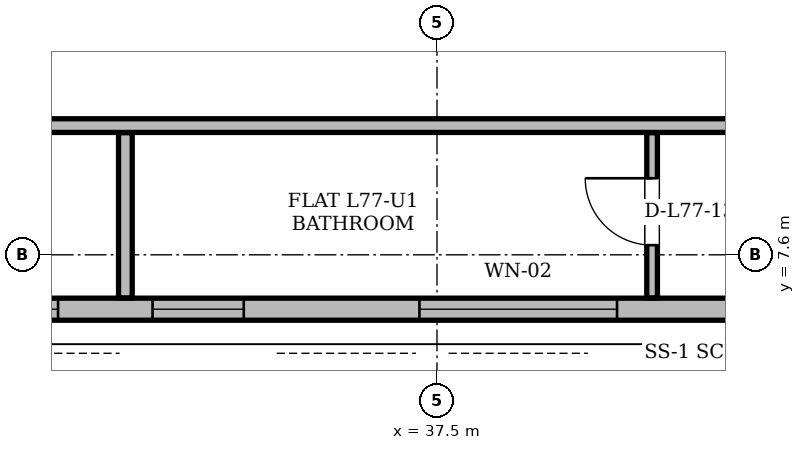
"""IFC4 building model, lengths in metres.
Left out: names, types, materials, properties, quantities, classifications, styles, units other than length and angle.
Written with IfcOpenShell. Run it as: python <this file> out.ifc"""

import sys

from ifc_helpers import new_model, si_unit, direction, frame, frame_2d, origin, place, context, subcontext, project, spatial, rectangle, extrude, element, fill, save


model = new_model("IFC4")
c1 = context("Model", 3, precision=1e-05, world=origin(), true_north=direction((0.0, 1.0)))
c2 = subcontext(c1, "Body", "Model", "MODEL_VIEW")
j1 = project(units=[si_unit("LENGTHUNIT", "METRE"), si_unit("PLANEANGLEUNIT", "RADIAN")], contexts=[c1])
p1 = place(None, origin())
s1 = spatial("IfcSite", under=j1, at=p1, CompositionType="ELEMENT")
p2 = place(p1, origin())
s2 = spatial("IfcBuilding", under=s1, at=p2, CompositionType="ELEMENT")
p3 = place(p2, frame((0.0, 0.0, 292.8)))
s3 = spatial("IfcBuildingStorey", under=s2, at=p3, CompositionType="ELEMENT", Elevation=292.8)
p4 = place(p3, frame((18.715, 6.885, 0.0), z_axis=(0.0, 0.0, 1.0), x_axis=(1.0, 0.0, 0.0)))
e1 = element("IfcWall", 1, at=p4, inside=s3, PredefinedType="SOLIDWALL", context=c2, shape_type="SweptSolid", body=[
    extrude(rectangle(XDim=37.57, YDim=0.29, at=frame_2d((18.785, 0.0))), origin(), (0.0, 0.0, 1.0), 3.058),
])
p5 = place(p4, frame((8.034, 0.0, 0.0)))
e2 = element("IfcOpeningElement", 2, at=p5, cuts=e1, PredefinedType="OPENING", context=c2, shape_type="SweptSolid", body=[
    extrude(rectangle(XDim=1.5, YDim=2.2, at=frame_2d((0.75, 1.1))), frame((0.0, 0.145, 0.0), z_axis=(0.0, -1.0, 0.0), x_axis=(1.0, 0.0, 0.0)), (0.0, 0.0, 1.0), 0.29),
])
p6 = place(p4, frame((32.431, 0.0, 0.0)))
e3 = element("IfcOpeningElement", 3, at=p6, cuts=e1, PredefinedType="OPENING", context=c2, shape_type="SweptSolid", body=[
    extrude(rectangle(XDim=1.5, YDim=2.2, at=frame_2d((0.75, 1.1))), frame((0.0, 0.145, 0.0), z_axis=(0.0, -1.0, 0.0), x_axis=(1.0, 0.0, 0.0)), (0.0, 0.0, 1.0), 0.29),
])
p7 = place(p4, frame((23.78, 0.0, 0.85)))
e4 = element("IfcOpeningElement", 4, at=p7, cuts=e1, PredefinedType="OPENING", context=c2, shape_type="SweptSolid", body=[
    extrude(rectangle(XDim=1.2, YDim=1.48, at=frame_2d((0.6, 0.74))), frame((0.0, 0.145, 0.0), z_axis=(0.0, -1.0, 0.0), x_axis=(1.0, 0.0, 0.0)), (0.0, 0.0, 1.0), 0.29),
])
p8 = place(p4, frame((34.515, 0.0, 0.85)))
e5 = element("IfcOpeningElement", 5, at=p8, cuts=e1, PredefinedType="OPENING", context=c2, shape_type="SweptSolid", body=[
    extrude(rectangle(XDim=1.2, YDim=1.48, at=frame_2d((0.6, 0.74))), frame((0.0, 0.145, 0.0), z_axis=(0.0, -1.0, 0.0), x_axis=(1.0, 0.0, 0.0)), (0.0, 0.0, 1.0), 0.29),
])
p9 = place(p4, frame((15.042, 0.0, 0.85)))
e6 = element("IfcOpeningElement", 6, at=p9, cuts=e1, PredefinedType="OPENING", context=c2, shape_type="SweptSolid", body=[
    extrude(rectangle(XDim=1.2, YDim=1.48, at=frame_2d((0.6, 0.74))), frame((0.0, 0.145, 0.0), z_axis=(0.0, -1.0, 0.0), x_axis=(1.0, 0.0, 0.0)), (0.0, 0.0, 1.0), 0.29),
])
p10 = place(p4, frame((18.554, 0.0, 0.85)))
e7 = element("IfcOpeningElement", 7, at=p10, cuts=e1, PredefinedType="OPENING", context=c2, shape_type="SweptSolid", body=[
    extrude(rectangle(XDim=2.6, YDim=1.95, at=frame_2d((1.3, 0.975))), frame((0.0, 0.145, 0.0), z_axis=(0.0, -1.0, 0.0), x_axis=(1.0, 0.0, 0.0)), (0.0, 0.0, 1.0), 0.29),
])
p11 = place(p4, frame((1.723, 0.0, 0.85)))
e8 = element("IfcOpeningElement", 8, at=p11, cuts=e1, PredefinedType="OPENING", context=c2, shape_type="SweptSolid", body=[
    extrude(rectangle(XDim=2.5, YDim=2.098, at=frame_2d((1.25, 1.049))), frame((0.0, 0.145, 0.0), z_axis=(0.0, -1.0, 0.0), x_axis=(1.0, 0.0, 0.0)), (0.0, 0.0, 1.0), 0.29),
])
p12 = place(p4, frame((12.599, 0.0, 0.85)))
e9 = element("IfcOpeningElement", 9, at=p12, cuts=e1, PredefinedType="OPENING", context=c2, shape_type="SweptSolid", body=[
    extrude(rectangle(XDim=1.2, YDim=1.48, at=frame_2d((0.6, 0.74))), frame((0.0, 0.145, 0.0), z_axis=(0.0, -1.0, 0.0), x_axis=(1.0, 0.0, 0.0)), (0.0, 0.0, 1.0), 0.29),
])
p13 = place(p3, frame((25.6, 9.3, 0.0), z_axis=(0.0, 0.0, 1.0), x_axis=(1.0, 0.0, 0.0)))
e10 = element("IfcWall", 10, at=p13, inside=s3, PredefinedType="PARTITIONING", context=c2, shape_type="SweptSolid", body=[
    extrude(rectangle(XDim=21.85, YDim=0.18, at=frame_2d((10.925, 0.0))), origin(), (0.0, 0.0, 1.0), 3.68),
])
p14 = place(p13, frame((3.868, 0.0, 0.0)))
e11 = element("IfcOpeningElement", 11, at=p14, cuts=e10, PredefinedType="OPENING", context=c2, shape_type="SweptSolid", body=[
    extrude(rectangle(XDim=1.0, YDim=2.18, at=frame_2d((0.5, 1.09))), frame((0.0, 0.09, 0.0), z_axis=(0.0, -1.0, 0.0), x_axis=(1.0, 0.0, 0.0)), (0.0, 0.0, 1.0), 0.18),
])
p15 = place(p13, frame((17.183, 0.0, 0.0)))
e12 = element("IfcOpeningElement", 12, at=p15, cuts=e10, PredefinedType="OPENING", context=c2, shape_type="SweptSolid", body=[
    extrude(rectangle(XDim=1.0, YDim=2.18, at=frame_2d((0.5, 1.09))), frame((0.0, 0.09, 0.0), z_axis=(0.0, -1.0, 0.0), x_axis=(1.0, 0.0, 0.0)), (0.0, 0.0, 1.0), 0.18),
])
p16 = place(p3, frame((33.4, 7.034, 0.0), z_axis=(0.0, 0.0, 1.0), x_axis=(0.0, 1.0, 0.0)))
e13 = element("IfcWall", 13, at=p16, inside=s3, PredefinedType="PARTITIONING", context=c2, shape_type="SweptSolid", body=[
    extrude(rectangle(XDim=2.172, YDim=0.18, at=frame_2d((1.086, 0.0))), origin(), (0.0, 0.0, 1.0), 3.68),
])
p17 = place(p3, frame((40.33, 7.034, 0.0), z_axis=(0.0, 0.0, 1.0), x_axis=(0.0, 1.0, 0.0)))
e14 = element("IfcWall", 14, at=p17, inside=s3, PredefinedType="PARTITIONING", context=c2, shape_type="SweptSolid", body=[
    extrude(rectangle(XDim=2.172, YDim=0.14, at=frame_2d((1.086, 0.0))), origin(), (0.0, 0.0, 1.0), 3.68),
])
p18 = place(p17, frame((0.694, 0.0, 0.0)))
e15 = element("IfcOpeningElement", 15, at=p18, cuts=e14, PredefinedType="OPENING", context=c2, shape_type="SweptSolid", body=[
    extrude(rectangle(XDim=0.88, YDim=2.08, at=frame_2d((0.44, 1.04))), frame((0.0, 0.07, 0.0), z_axis=(0.0, -1.0, 0.0), x_axis=(1.0, 0.0, 0.0)), (0.0, 0.0, 1.0), 0.14),
])
p19 = place(p9, origin())
e16 = element("IfcWindow", 16, at=p19, inside=s3, PartitioningType="SINGLE_PANEL", PredefinedType="WINDOW", context=c2, shape_type="SweptSolid", body=[
    extrude(rectangle(XDim=1.2, YDim=1.48, at=frame_2d((0.6, 0.74))), frame((0.0, 0.03, 0.0), z_axis=(0.0, -1.0, 0.0), x_axis=(1.0, 0.0, 0.0)), (0.0, 0.0, 1.0), 0.06),
])
fill(e6, e16)
p20 = place(p10, origin())
e17 = element("IfcWindow", 17, at=p20, inside=s3, PartitioningType="SINGLE_PANEL", PredefinedType="WINDOW", context=c2, shape_type="SweptSolid", body=[
    extrude(rectangle(XDim=2.6, YDim=1.95, at=frame_2d((1.3, 0.975))), frame((0.0, 0.03, 0.0), z_axis=(0.0, -1.0, 0.0), x_axis=(1.0, 0.0, 0.0)), (0.0, 0.0, 1.0), 0.06),
])
fill(e7, e17)
p21 = place(p12, origin())
e18 = element("IfcWindow", 18, at=p21, inside=s3, PartitioningType="SINGLE_PANEL", PredefinedType="WINDOW", context=c2, shape_type="SweptSolid", body=[
    extrude(rectangle(XDim=1.2, YDim=1.48, at=frame_2d((0.6, 0.74))), frame((0.0, 0.03, 0.0), z_axis=(0.0, -1.0, 0.0), x_axis=(1.0, 0.0, 0.0)), (0.0, 0.0, 1.0), 0.06),
])
fill(e9, e18)
p22 = place(p18, origin())
e19 = element("IfcDoor", 19, at=p22, inside=s3, OperationType="SINGLE_SWING_RIGHT", PredefinedType="DOOR", context=c2, shape_type="SweptSolid", body=[
    extrude(rectangle(XDim=0.88, YDim=2.08, at=frame_2d((0.44, 1.04))), frame((0.0, 0.025, 0.0), z_axis=(0.0, -1.0, 0.0), x_axis=(1.0, 0.0, 0.0)), (0.0, 0.0, 1.0), 0.05),
])
fill(e15, e19)
save(model, sys.argv[1])
